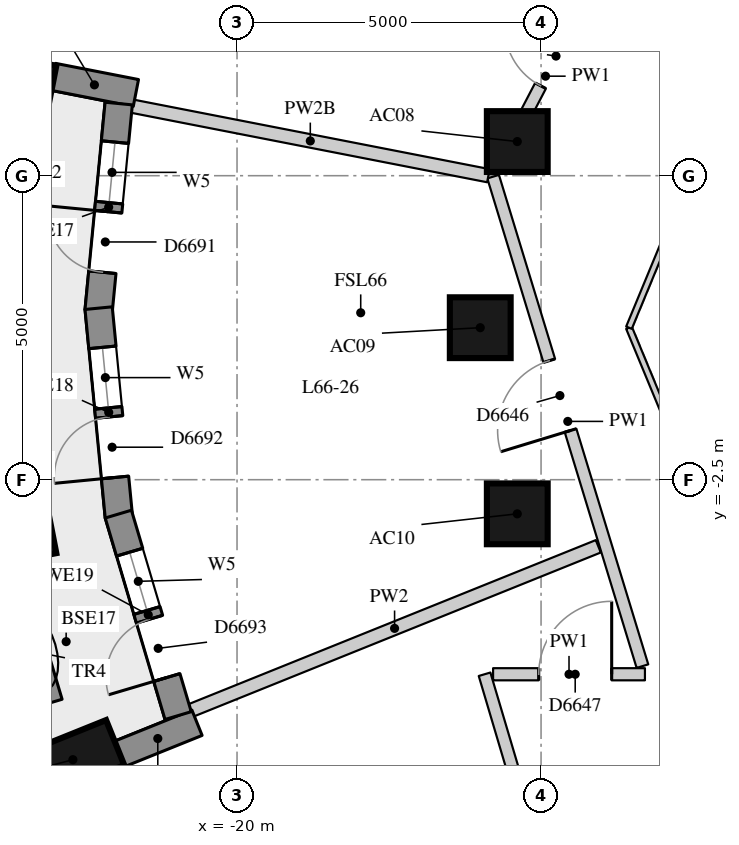
"""IFC4 building model, lengths in metres.
Left out: names, types, materials, properties, quantities, classifications, styles, units other than length and angle.
Written with IfcOpenShell. Run it as: python <this file> out.ifc"""

import sys

from ifc_helpers import new_model, si_unit, direction, frame, frame_2d, origin, origin_2d, place, context, subcontext, project, spatial, rectangle, extrude, element, fill, save


model = new_model("IFC4")
c1 = context("Model", 3, precision=1e-05, world=origin(), true_north=direction((0.0, 1.0)))
c2 = subcontext(c1, "Body", "Model", "MODEL_VIEW")
j1 = project(units=[si_unit("LENGTHUNIT", "METRE"), si_unit("PLANEANGLEUNIT", "RADIAN")], contexts=[c1])
p1 = place(None, origin())
s1 = spatial("IfcSite", under=j1, at=p1, CompositionType="ELEMENT")
p2 = place(p1, origin())
s2 = spatial("IfcBuilding", under=s1, at=p2, CompositionType="ELEMENT")
p3 = place(p2, frame((0.0, 0.0, 233.3)))
s3 = spatial("IfcBuildingStorey", under=s2, at=p3, CompositionType="ELEMENT", Elevation=233.3)
for number, where, z_axis, x_axis in (
    (1, (-23.785, 4.06, 0.0), (0.0, 0.0, 1.0), (-0.981, 0.192, 0.0)),
    (2, (-23.785, -3.459, 0.0), (0.0, 0.0, 1.0), (-0.981, -0.192, 0.0)),
    (3, (-22.7, -7.105, 0.0), (0.0, 0.0, 1.0), (-0.928, -0.374, 0.0)),
):
    element("IfcColumn", number, at=place(p3, frame(where, z_axis=z_axis, x_axis=x_axis)), inside=s3, PredefinedType="COLUMN", context=c2, shape_type="SweptSolid", body=[
        extrude(rectangle(XDim=1.5, YDim=0.8, at=origin_2d()), origin(), (0.0, 0.0, 1.0), 3.3),
    ])
for number, where, z_axis, x_axis in (
    (4, (-15.391, 3.062, 0.0), (0.0, 0.0, 1.0), (1.0, 0.0, 0.0)),
    (5, (-16.0, 0.0, 0.0), (0.0, 0.0, 1.0), (1.0, 0.0, 0.0)),
    (6, (-15.391, -3.062, 0.0), (0.0, 0.0, 1.0), (1.0, 0.0, 0.0)),
):
    element("IfcColumn", number, at=place(p3, frame(where, z_axis=z_axis, x_axis=x_axis)), inside=s3, PredefinedType="COLUMN", context=c2, shape_type="SweptSolid", body=[
        extrude(rectangle(XDim=1.0, YDim=1.0, at=origin_2d()), origin(), (0.0, 0.0, 1.0), 3.3),
    ])
p4 = place(p3, frame((-23.028, 4.127, 0.0), z_axis=(0.0, 0.0, 1.0), x_axis=(0.981468844755, -0.191621780535, 0.0)))
e7 = element("IfcWall", 7, at=p4, inside=s3, PredefinedType="SOLIDWALL", context=c2, shape_type="SweptSolid", body=[
    extrude(rectangle(XDim=1.39, YDim=0.45, at=frame_2d((0.695, 0.0))), origin(), (0.0, 0.0, 1.0), 2.57),
])
p5 = place(p3, frame((-21.948, -7.017, 0.0), z_axis=(0.0, 0.0, 1.0), x_axis=(0.927577935879, 0.373629726964, 0.0)))
e8 = element("IfcWall", 8, at=p5, inside=s3, PredefinedType="SOLIDWALL", context=c2, shape_type="SweptSolid", body=[
    extrude(rectangle(XDim=1.39, YDim=0.45, at=frame_2d((0.695, 0.0))), origin(), (0.0, 0.0, 1.0), 3.02),
])
p6 = place(p3, frame((-21.946, 3.687, 0.0), z_axis=(0.0, 0.0, 1.0), x_axis=(-0.096467747711, -0.995336110895, 0.0)))
e9 = element("IfcWall", 9, at=p6, inside=s3, PredefinedType="SOLIDWALL", context=c2, shape_type="SweptSolid", body=[
    extrude(rectangle(XDim=3.424, YDim=0.45, at=frame_2d((1.712, 0.0))), origin(), (0.0, 0.0, 1.0), 3.02),
])
p7 = place(p6, frame((0.637, 0.0, 0.4)))
e10 = element("IfcOpeningElement", 10, at=p7, cuts=e9, PredefinedType="OPENING", context=c2, shape_type="SweptSolid", body=[
    extrude(rectangle(XDim=1.0, YDim=1.75, at=frame_2d((0.5, 0.875))), frame((0.0, 0.235, 0.0), z_axis=(0.0, -1.0, 0.0), x_axis=(1.0, 0.0, 0.0)), (0.0, 0.0, 1.0), 0.47),
])
p8 = place(p6, frame((1.787, 0.0, 0.0)))
e11 = element("IfcOpeningElement", 11, at=p8, cuts=e9, PredefinedType="OPENING", context=c2, shape_type="SweptSolid", body=[
    extrude(rectangle(XDim=1.0, YDim=2.15, at=frame_2d((0.5, 1.075))), frame((0.0, 0.235, 0.0), z_axis=(0.0, -1.0, 0.0), x_axis=(1.0, 0.0, 0.0)), (0.0, 0.0, 1.0), 0.47),
])
p9 = place(p3, frame((-22.276, 0.322, 0.0), z_axis=(0.0, 0.0, 1.0), x_axis=(0.096423819494, -0.995340367429, 0.0)))
e12 = element("IfcWall", 12, at=p9, inside=s3, PredefinedType="SOLIDWALL", context=c2, shape_type="SweptSolid", body=[
    extrude(rectangle(XDim=3.446, YDim=0.45, at=frame_2d((1.723, 0.0))), origin(), (0.0, 0.0, 1.0), 3.02),
])
p10 = place(p9, frame((0.648, 0.0, 0.4)))
e13 = element("IfcOpeningElement", 13, at=p10, cuts=e12, PredefinedType="OPENING", context=c2, shape_type="SweptSolid", body=[
    extrude(rectangle(XDim=1.0, YDim=1.75, at=frame_2d((0.5, 0.875))), frame((0.0, 0.235, 0.0), z_axis=(0.0, -1.0, 0.0), x_axis=(1.0, 0.0, 0.0)), (0.0, 0.0, 1.0), 0.47),
])
p11 = place(p9, frame((1.798, 0.0, 0.0)))
e14 = element("IfcOpeningElement", 14, at=p11, cuts=e12, PredefinedType="OPENING", context=c2, shape_type="SweptSolid", body=[
    extrude(rectangle(XDim=1.0, YDim=2.15, at=frame_2d((0.5, 1.075))), frame((0.0, 0.235, 0.0), z_axis=(0.0, -1.0, 0.0), x_axis=(1.0, 0.0, 0.0)), (0.0, 0.0, 1.0), 0.47),
])
p12 = place(p3, frame((-21.952, -3.066, 0.0), z_axis=(0.0, 0.0, 1.0), x_axis=(0.284437019833, -0.958694728132, 0.0)))
e15 = element("IfcWall", 15, at=p12, inside=s3, PredefinedType="SOLIDWALL", context=c2, shape_type="SweptSolid", body=[
    extrude(rectangle(XDim=3.457, YDim=0.45, at=frame_2d((1.728, 0.0))), origin(), (0.0, 0.0, 1.0), 3.02),
])
p13 = place(p12, frame((0.653, 0.0, 0.4)))
e16 = element("IfcOpeningElement", 16, at=p13, cuts=e15, PredefinedType="OPENING", context=c2, shape_type="SweptSolid", body=[
    extrude(rectangle(XDim=1.0, YDim=1.75, at=frame_2d((0.5, 0.875))), frame((0.0, 0.235, 0.0), z_axis=(0.0, -1.0, 0.0), x_axis=(1.0, 0.0, 0.0)), (0.0, 0.0, 1.0), 0.47),
])
p14 = place(p12, frame((1.803, 0.0, 0.0)))
e17 = element("IfcOpeningElement", 17, at=p14, cuts=e15, PredefinedType="OPENING", context=c2, shape_type="SweptSolid", body=[
    extrude(rectangle(XDim=1.0, YDim=2.15, at=frame_2d((0.5, 1.075))), frame((0.0, 0.235, 0.0), z_axis=(0.0, -1.0, 0.0), x_axis=(1.0, 0.0, 0.0)), (0.0, 0.0, 1.0), 0.47),
])
p15 = place(p3, frame((-23.726, -4.486, 0.0), z_axis=(0.0, 0.0, 1.0), x_axis=(0.285219480859, -0.958462230731, 0.0)))
e18 = element("IfcWall", 18, at=p15, inside=s3, PredefinedType="USERDEFINED", context=c2, shape_type="SweptSolid", body=[
    extrude(rectangle(XDim=1.8, YDim=0.7, at=frame_2d((0.9, 0.0))), origin(), (0.0, 0.0, 1.0), 0.75),
])
p16 = place(p3, frame((-14.815, -9.452, 0.0), z_axis=(0.0, 0.0, 1.0), x_axis=(-0.284600079658, 0.958646334504, 0.0)))
e19 = element("IfcWall", 19, at=p16, inside=s3, PredefinedType="PARTITIONING", context=c2, shape_type="SweptSolid", body=[
    extrude(rectangle(XDim=3.914, YDim=0.2, at=frame_2d((1.957, 0.0))), origin(), (0.0, 0.0, 1.0), 3.02),
])
p17 = place(p3, frame((-15.789, -5.7, 0.0), z_axis=(0.0, 0.0, 1.0), x_axis=(1.0, 0.0, 0.0)))
e20 = element("IfcWall", 20, at=p17, inside=s3, PredefinedType="PARTITIONING", context=c2, shape_type="SweptSolid", body=[
    extrude(rectangle(XDim=2.497, YDim=0.2, at=frame_2d((1.249, 0.0))), origin(), (0.0, 0.0, 1.0), 3.02),
])
p18 = place(p17, frame((0.75, 0.0, 0.0)))
e21 = element("IfcOpeningElement", 21, at=p18, cuts=e20, PredefinedType="OPENING", context=c2, shape_type="SweptSolid", body=[
    extrude(rectangle(XDim=1.2, YDim=2.1, at=frame_2d((0.6, 1.05))), frame((0.0, 0.11, 0.0), z_axis=(0.0, -1.0, 0.0), x_axis=(1.0, 0.0, 0.0)), (0.0, 0.0, 1.0), 0.22),
])
p19 = place(p3, frame((-13.333, -5.567, 0.0), z_axis=(0.0, 0.0, 1.0), x_axis=(-0.291732883234, 0.956499830026, 0.0)))
e22 = element("IfcWall", 22, at=p19, inside=s3, PredefinedType="PARTITIONING", context=c2, shape_type="SweptSolid", body=[
    extrude(rectangle(XDim=8.417, YDim=0.2, at=frame_2d((4.208, 0.0))), origin(), (0.0, 0.0, 1.0), 3.02),
])
p20 = place(p19, frame((4.053, 0.0, 0.0)))
e23 = element("IfcOpeningElement", 23, at=p20, cuts=e22, PredefinedType="OPENING", context=c2, shape_type="SweptSolid", body=[
    extrude(rectangle(XDim=1.2, YDim=2.1, at=frame_2d((0.6, 1.05))), frame((0.0, 0.11, 0.0), z_axis=(0.0, -1.0, 0.0), x_axis=(1.0, 0.0, 0.0)), (0.0, 0.0, 1.0), 0.22),
])
p21 = place(p3, frame((-15.742, 2.573, 0.0), z_axis=(0.0, 0.0, 1.0), x_axis=(0.462435860297, 0.886652736482, 0.0)))
e24 = element("IfcWall", 24, at=p21, inside=s3, PredefinedType="PARTITIONING", context=c2, shape_type="SweptSolid", body=[
    extrude(rectangle(XDim=3.526, YDim=0.2, at=frame_2d((1.763, 0.0))), origin(), (0.0, 0.0, 1.0), 3.02),
])
p22 = place(p21, frame((1.586, 0.0, 0.0)))
e25 = element("IfcOpeningElement", 25, at=p22, cuts=e24, PredefinedType="OPENING", context=c2, shape_type="SweptSolid", body=[
    extrude(rectangle(XDim=1.1, YDim=2.1, at=frame_2d((0.55, 1.05))), frame((0.0, 0.11, 0.0), z_axis=(0.0, -1.0, 0.0), x_axis=(1.0, 0.0, 0.0)), (0.0, 0.0, 1.0), 0.22),
])
p23 = place(p3, frame((-21.724, 3.643, 0.0), z_axis=(0.0, 0.0, 1.0), x_axis=(0.981479525595, -0.191567066159, 0.0)))
e26 = element("IfcWall", 26, at=p23, inside=s3, PredefinedType="PARTITIONING", context=c2, shape_type="SweptSolid", body=[
    extrude(rectangle(XDim=5.968, YDim=0.22, at=frame_2d((2.984, 0.0))), origin(), (0.0, 0.0, 1.0), 2.57),
])
p24 = place(p3, frame((-20.759, -6.295, 0.0), z_axis=(0.0, 0.0, 1.0), x_axis=(0.927536731172, 0.373732006023, 0.0)))
e27 = element("IfcWall", 27, at=p24, inside=s3, PredefinedType="PARTITIONING", context=c2, shape_type="SweptSolid", body=[
    extrude(rectangle(XDim=7.224, YDim=0.22, at=frame_2d((3.612, 0.0))), origin(), (0.0, 0.0, 1.0), 3.02),
])
for number, where, z_axis, x_axis in (
    (28, (-11.927, -3.927, 0.0), (0.0, 0.0, 1.0), (-0.383, 0.924, 0.0)),
    (29, (-13.554, 0.0, 0.0), (0.0, 0.0, 1.0), (0.383, 0.924, 0.0)),
):
    element("IfcWall", number, at=place(p3, frame(where, z_axis=z_axis, x_axis=x_axis)), inside=s3, PredefinedType="PARTITIONING", context=c2, shape_type="SweptSolid", body=[
        extrude(rectangle(XDim=4.251, YDim=0.1, at=frame_2d((2.125, 0.0))), origin(), (0.0, 0.0, 1.0), 3.02),
    ])
p25 = place(p7, origin())
e30 = element("IfcWindow", 30, at=p25, inside=s3, PartitioningType="SINGLE_PANEL", PredefinedType="WINDOW", context=c2, shape_type="SweptSolid", body=[
    extrude(rectangle(XDim=1.0, YDim=1.75, at=frame_2d((0.5, 0.875))), frame((0.0, 0.035, 0.0), z_axis=(0.0, -1.0, 0.0), x_axis=(1.0, 0.0, 0.0)), (0.0, 0.0, 1.0), 0.06),
])
fill(e10, e30)
p26 = place(p8, frame((1.0, 0.0, 0.0), z_axis=(0.0, 0.0, 1.0), x_axis=(-1.0, 0.0, 0.0)))
e31 = element("IfcDoor", 31, at=p26, inside=s3, OperationType="SINGLE_SWING_RIGHT", PredefinedType="DOOR", context=c2, shape_type="SweptSolid", body=[
    extrude(rectangle(XDim=1.0, YDim=2.15, at=frame_2d((0.5, 1.075))), frame((0.0, 0.075, 0.0), z_axis=(0.0, -1.0, 0.0), x_axis=(1.0, 0.0, 0.0)), (0.0, 0.0, 1.0), 0.05),
])
fill(e11, e31)
p27 = place(p10, origin())
e32 = element("IfcWindow", 32, at=p27, inside=s3, PartitioningType="SINGLE_PANEL", PredefinedType="WINDOW", context=c2, shape_type="SweptSolid", body=[
    extrude(rectangle(XDim=1.0, YDim=1.75, at=frame_2d((0.5, 0.875))), frame((0.0, 0.035, 0.0), z_axis=(0.0, -1.0, 0.0), x_axis=(1.0, 0.0, 0.0)), (0.0, 0.0, 1.0), 0.06),
])
fill(e13, e32)
p28 = place(p11, frame((1.0, 0.0, 0.0), z_axis=(0.0, 0.0, 1.0), x_axis=(-1.0, 0.0, 0.0)))
e33 = element("IfcDoor", 33, at=p28, inside=s3, OperationType="SINGLE_SWING_LEFT", PredefinedType="DOOR", context=c2, shape_type="SweptSolid", body=[
    extrude(rectangle(XDim=1.0, YDim=2.15, at=frame_2d((0.5, 1.075))), frame((0.0, 0.075, 0.0), z_axis=(0.0, -1.0, 0.0), x_axis=(1.0, 0.0, 0.0)), (0.0, 0.0, 1.0), 0.05),
])
fill(e14, e33)
p29 = place(p13, origin())
e34 = element("IfcWindow", 34, at=p29, inside=s3, PartitioningType="SINGLE_PANEL", PredefinedType="WINDOW", context=c2, shape_type="SweptSolid", body=[
    extrude(rectangle(XDim=1.0, YDim=1.75, at=frame_2d((0.5, 0.875))), frame((0.0, 0.035, 0.0), z_axis=(0.0, -1.0, 0.0), x_axis=(1.0, 0.0, 0.0)), (0.0, 0.0, 1.0), 0.06),
])
fill(e16, e34)
p30 = place(p14, frame((1.0, 0.0, 0.0), z_axis=(0.0, 0.0, 1.0), x_axis=(-1.0, 0.0, 0.0)))
e35 = element("IfcDoor", 35, at=p30, inside=s3, OperationType="SINGLE_SWING_LEFT", PredefinedType="DOOR", context=c2, shape_type="SweptSolid", body=[
    extrude(rectangle(XDim=1.0, YDim=2.15, at=frame_2d((0.5, 1.075))), frame((0.0, 0.075, 0.0), z_axis=(0.0, -1.0, 0.0), x_axis=(1.0, 0.0, 0.0)), (0.0, 0.0, 1.0), 0.05),
])
fill(e17, e35)
p31 = place(p22, origin())
e36 = element("IfcDoor", 36, at=p31, inside=s3, OperationType="SINGLE_SWING_RIGHT", PredefinedType="DOOR", context=c2, shape_type="SweptSolid", body=[
    extrude(rectangle(XDim=1.1, YDim=2.1, at=frame_2d((0.55, 1.05))), frame((0.0, 0.025, 0.0), z_axis=(0.0, -1.0, 0.0), x_axis=(1.0, 0.0, 0.0)), (0.0, 0.0, 1.0), 0.05),
])
fill(e25, e36)
p32 = place(p20, origin())
e37 = element("IfcDoor", 37, at=p32, inside=s3, OperationType="SINGLE_SWING_LEFT", PredefinedType="DOOR", context=c2, shape_type="SweptSolid", body=[
    extrude(rectangle(XDim=1.2, YDim=2.1, at=frame_2d((0.6, 1.05))), frame((0.0, 0.025, 0.0), z_axis=(0.0, -1.0, 0.0), x_axis=(1.0, 0.0, 0.0)), (0.0, 0.0, 1.0), 0.05),
])
fill(e23, e37)
p33 = place(p18, origin())
e38 = element("IfcDoor", 38, at=p33, inside=s3, OperationType="SINGLE_SWING_RIGHT", PredefinedType="DOOR", context=c2, shape_type="SweptSolid", body=[
    extrude(rectangle(XDim=1.2, YDim=2.1, at=frame_2d((0.6, 1.05))), frame((0.0, 0.025, 0.0), z_axis=(0.0, -1.0, 0.0), x_axis=(1.0, 0.0, 0.0)), (0.0, 0.0, 1.0), 0.05),
])
fill(e21, e38)
save(model, sys.argv[1])
